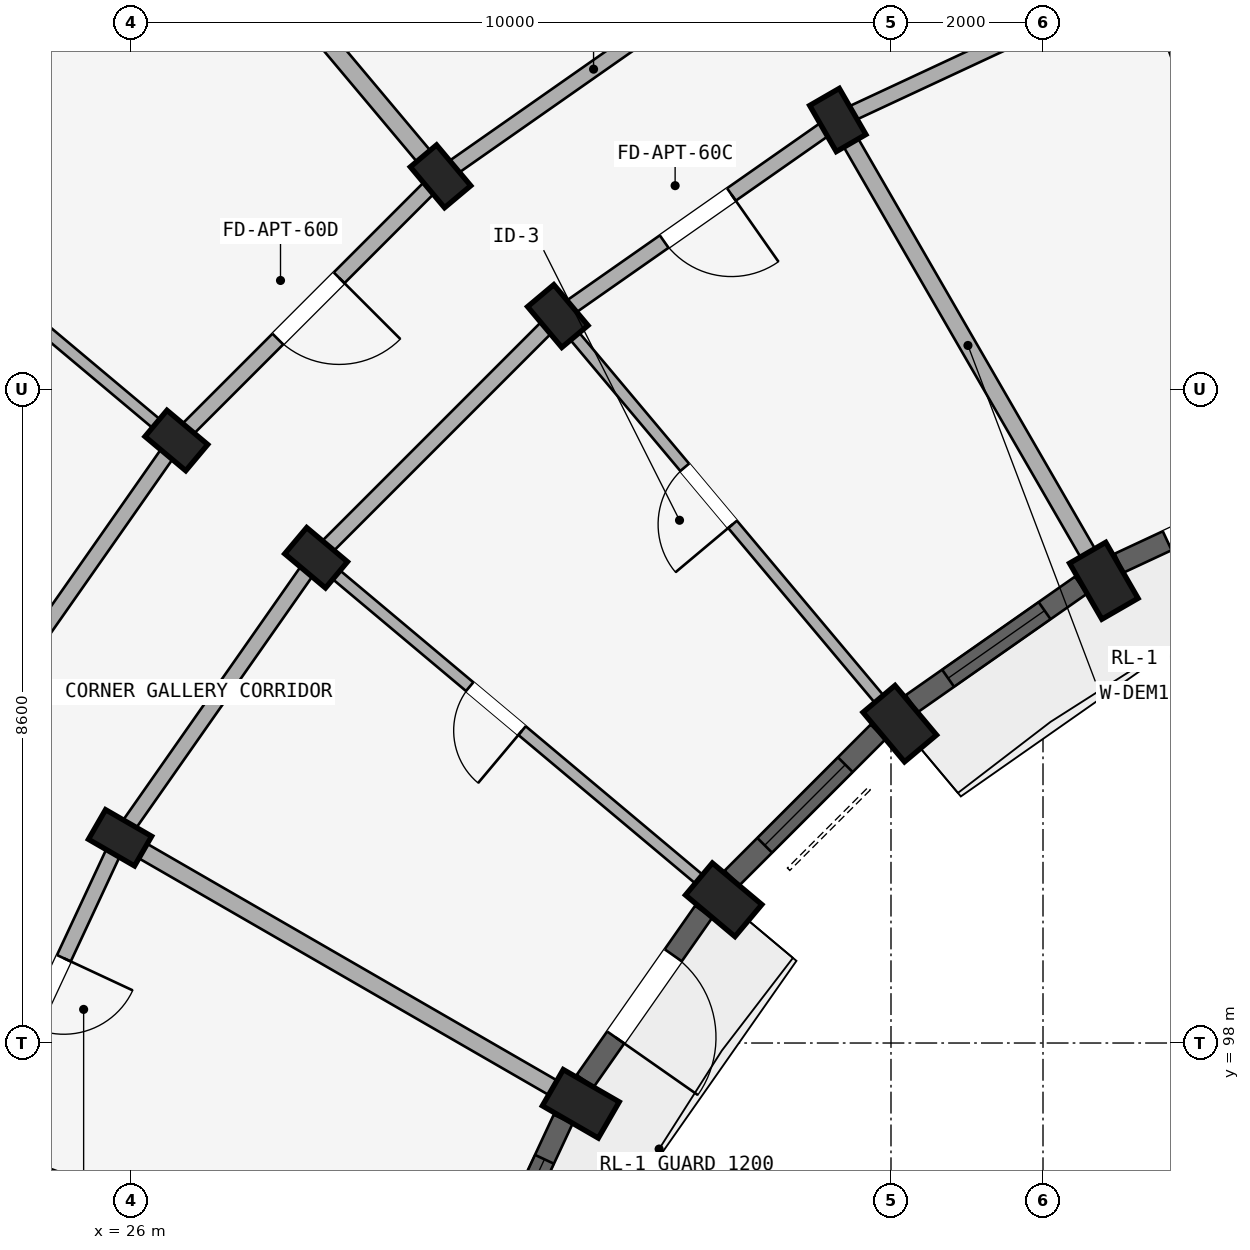
"""IFC4 building model, lengths in metres.
Left out: names, types, materials, properties, quantities, classifications, styles, units other than length and angle.
Written with IfcOpenShell. Run it as: python <this file> out.ifc"""

import sys

from ifc_helpers import new_model, si_unit, direction, frame, frame_2d, origin, origin_2d, place, context, subcontext, project, spatial, rectangle, extrude, element, fill, save


model = new_model("IFC4")
c1 = context("Model", 3, precision=1e-05, world=origin(), true_north=direction((0.0, 1.0)))
c2 = subcontext(c1, "Body", "Model", "MODEL_VIEW")
j1 = project(units=[si_unit("LENGTHUNIT", "METRE"), si_unit("PLANEANGLEUNIT", "RADIAN")], contexts=[c1])
p1 = place(None, origin())
s1 = spatial("IfcSite", under=j1, at=p1, CompositionType="ELEMENT")
p2 = place(p1, origin())
s2 = spatial("IfcBuilding", under=s1, at=p2, CompositionType="ELEMENT")
p3 = place(p2, frame((0.0, 0.0, 11.85)))
s3 = spatial("IfcBuildingStorey", under=s2, at=p3, CompositionType="ELEMENT", Elevation=11.85)
p4 = place(p3, frame((38.8, 104.081, 0.0), z_axis=(0.0, 0.0, 1.0), x_axis=(0.866025403784, 0.5, 0.0)))
e1 = element("IfcColumn", 1, at=p4, inside=s3, PredefinedType="COLUMN", context=c2, shape_type="SweptSolid", body=[
    extrude(rectangle(XDim=0.55, YDim=0.85, at=origin_2d()), origin(), (0.0, 0.0, 1.0), 2.93),
])
p5 = place(p3, frame((35.3, 110.144, 0.0), z_axis=(0.0, 0.0, 1.0), x_axis=(0.866025403784, 0.5, 0.0)))
e2 = element("IfcColumn", 2, at=p5, inside=s3, PredefinedType="COLUMN", context=c2, shape_type="SweptSolid", body=[
    extrude(rectangle(XDim=0.45, YDim=0.7, at=origin_2d()), origin(), (0.0, 0.0, 1.0), 2.93),
])
p6 = place(p3, frame((36.115, 102.202, 0.0), z_axis=(0.0, 0.0, 1.0), x_axis=(0.766044443119, 0.642787609687, 0.0)))
e3 = element("IfcColumn", 3, at=p6, inside=s3, PredefinedType="COLUMN", context=c2, shape_type="SweptSolid", body=[
    extrude(rectangle(XDim=0.55, YDim=0.85, at=origin_2d()), origin(), (0.0, 0.0, 1.0), 2.93),
])
for number, where, z_axis, x_axis in (
    (4, (31.616, 107.564, 0.0), (0.0, 0.0, 1.0), (0.766, 0.643, 0.0)),
    (5, (30.073, 109.402, 0.0), (0.0, 0.0, 1.0), (0.766, 0.643, 0.0)),
):
    element("IfcColumn", number, at=place(p3, frame(where, z_axis=z_axis, x_axis=x_axis)), inside=s3, PredefinedType="COLUMN", context=c2, shape_type="SweptSolid", body=[
        extrude(rectangle(XDim=0.45, YDim=0.7, at=origin_2d()), origin(), (0.0, 0.0, 1.0), 2.93),
    ])
p7 = place(p3, frame((33.798, 99.885, 0.0), z_axis=(0.0, 0.0, 1.0), x_axis=(0.642787609687, 0.766044443119, 0.0)))
e6 = element("IfcColumn", 6, at=p7, inside=s3, PredefinedType="COLUMN", context=c2, shape_type="SweptSolid", body=[
    extrude(rectangle(XDim=0.55, YDim=0.85, at=origin_2d()), origin(), (0.0, 0.0, 1.0), 2.93),
])
for number, where, z_axis, x_axis in (
    (7, (28.436, 104.384, 0.0), (0.0, 0.0, 1.0), (0.643, 0.766, 0.0)),
    (8, (26.598, 105.927, 0.0), (0.0, 0.0, 1.0), (0.643, 0.766, 0.0)),
):
    element("IfcColumn", number, at=place(p3, frame(where, z_axis=z_axis, x_axis=x_axis)), inside=s3, PredefinedType="COLUMN", context=c2, shape_type="SweptSolid", body=[
        extrude(rectangle(XDim=0.45, YDim=0.7, at=origin_2d()), origin(), (0.0, 0.0, 1.0), 2.93),
    ])
p8 = place(p3, frame((31.919, 97.2, 0.0), z_axis=(0.0, 0.0, 1.0), x_axis=(0.5, 0.866025403784, 0.0)))
e9 = element("IfcColumn", 9, at=p8, inside=s3, PredefinedType="COLUMN", context=c2, shape_type="SweptSolid", body=[
    extrude(rectangle(XDim=0.55, YDim=0.85, at=origin_2d()), origin(), (0.0, 0.0, 1.0), 2.93),
])
p9 = place(p3, frame((25.856, 100.7, 0.0), z_axis=(0.0, 0.0, 1.0), x_axis=(0.5, 0.866025403784, 0.0)))
e10 = element("IfcColumn", 10, at=p9, inside=s3, PredefinedType="COLUMN", context=c2, shape_type="SweptSolid", body=[
    extrude(rectangle(XDim=0.45, YDim=0.7, at=origin_2d()), origin(), (0.0, 0.0, 1.0), 2.93),
])
p10 = place(p3, frame((39.376, 112.044, 0.0), z_axis=(0.0, 0.0, 1.0), x_axis=(-0.906307919131, -0.422617978463, 0.0)))
e11 = element("IfcWall", 11, at=p10, inside=s3, PredefinedType="STANDARD", context=c2, shape_type="SweptSolid", body=[
    extrude(rectangle(XDim=4.497, YDim=0.2, at=frame_2d((2.249, 0.0))), origin(), (0.0, 0.0, 1.0), 2.372),
])
p11 = place(p3, frame((35.3, 110.144, 0.0), z_axis=(0.0, 0.0, 1.0), x_axis=(-0.819155404658, -0.573571637217, 0.0)))
e12 = element("IfcWall", 12, at=p11, inside=s3, PredefinedType="STANDARD", context=c2, shape_type="SweptSolid", body=[
    extrude(rectangle(XDim=4.497, YDim=0.2, at=frame_2d((2.249, 0.0))), origin(), (0.0, 0.0, 1.0), 2.372),
])
p12 = place(p11, frame((1.709, 0.0, 0.0)))
e13 = element("IfcOpeningElement", 13, at=p12, cuts=e12, PredefinedType="OPENING", context=c2, shape_type="SweptSolid", body=[
    extrude(rectangle(XDim=1.08, YDim=2.15, at=frame_2d((0.54, 1.075))), frame((0.0, 0.11, 0.0), z_axis=(0.0, -1.0, 0.0), x_axis=(1.0, 0.0, 0.0)), (0.0, 0.0, 1.0), 0.22),
])
p13 = place(p3, frame((34.1, 112.222, 0.0), z_axis=(0.0, 0.0, 1.0), x_axis=(-0.819140911474, -0.573592335331, 0.0)))
e14 = element("IfcWall", 14, at=p13, inside=s3, PredefinedType="STANDARD", context=c2, shape_type="SweptSolid", body=[
    extrude(rectangle(XDim=4.916, YDim=0.2, at=frame_2d((2.458, 0.0))), origin(), (0.0, 0.0, 1.0), 2.372),
])
p14 = place(p3, frame((31.616, 107.564, 0.0), z_axis=(0.0, 0.0, 1.0), x_axis=(-0.707106781187, -0.707106781187, 0.0)))
e15 = element("IfcWall", 15, at=p14, inside=s3, PredefinedType="STANDARD", context=c2, shape_type="SweptSolid", body=[
    extrude(rectangle(XDim=4.497, YDim=0.2, at=frame_2d((2.249, 0.0))), origin(), (0.0, 0.0, 1.0), 2.372),
])
p15 = place(p3, frame((30.073, 109.402, 0.0), z_axis=(0.0, 0.0, 1.0), x_axis=(-0.707106781187, -0.707106781187, 0.0)))
e16 = element("IfcWall", 16, at=p15, inside=s3, PredefinedType="STANDARD", context=c2, shape_type="SweptSolid", body=[
    extrude(rectangle(XDim=4.916, YDim=0.2, at=frame_2d((2.458, 0.0))), origin(), (0.0, 0.0, 1.0), 2.372),
])
p16 = place(p15, frame((1.888, 0.0, 0.0)))
e17 = element("IfcOpeningElement", 17, at=p16, cuts=e16, PredefinedType="OPENING", context=c2, shape_type="SweptSolid", body=[
    extrude(rectangle(XDim=1.14, YDim=2.15, at=frame_2d((0.57, 1.075))), frame((0.0, 0.11, 0.0), z_axis=(0.0, -1.0, 0.0), x_axis=(1.0, 0.0, 0.0)), (0.0, 0.0, 1.0), 0.22),
])
p17 = place(p3, frame((28.436, 104.384, 0.0), z_axis=(0.0, 0.0, 1.0), x_axis=(-0.573571637217, -0.819155404658, 0.0)))
e18 = element("IfcWall", 18, at=p17, inside=s3, PredefinedType="STANDARD", context=c2, shape_type="SweptSolid", body=[
    extrude(rectangle(XDim=4.497, YDim=0.2, at=frame_2d((2.249, 0.0))), origin(), (0.0, 0.0, 1.0), 2.372),
])
p18 = place(p3, frame((26.598, 105.927, 0.0), z_axis=(0.0, 0.0, 1.0), x_axis=(-0.573592335331, -0.819140911474, 0.0)))
e19 = element("IfcWall", 19, at=p18, inside=s3, PredefinedType="STANDARD", context=c2, shape_type="SweptSolid", body=[
    extrude(rectangle(XDim=4.916, YDim=0.2, at=frame_2d((2.458, 0.0))), origin(), (0.0, 0.0, 1.0), 2.372),
])
p19 = place(p3, frame((25.856, 100.7, 0.0), z_axis=(0.0, 0.0, 1.0), x_axis=(-0.422617978463, -0.906307919131, 0.0)))
e20 = element("IfcWall", 20, at=p19, inside=s3, PredefinedType="STANDARD", context=c2, shape_type="SweptSolid", body=[
    extrude(rectangle(XDim=4.497, YDim=0.2, at=frame_2d((2.249, 0.0))), origin(), (0.0, 0.0, 1.0), 2.372),
])
p20 = place(p19, frame((1.749, 0.0, 0.0)))
e21 = element("IfcOpeningElement", 21, at=p20, cuts=e20, PredefinedType="OPENING", context=c2, shape_type="SweptSolid", body=[
    extrude(rectangle(XDim=1.0, YDim=2.15, at=frame_2d((0.5, 1.075))), frame((0.0, 0.11, 0.0), z_axis=(0.0, -1.0, 0.0), x_axis=(1.0, 0.0, 0.0)), (0.0, 0.0, 1.0), 0.22),
])
p21 = place(p3, frame((41.702, 105.654, 0.0), z_axis=(0.0, 0.0, 1.0), x_axis=(-0.342010221662, 0.939696231917, 0.0)))
e22 = element("IfcWall", 22, at=p21, inside=s3, PredefinedType="PARTITIONING", context=c2, shape_type="SweptSolid", body=[
    extrude(rectangle(XDim=6.75, YDim=0.15, at=frame_2d((3.375, 0.0))), origin(), (0.0, 0.0, 1.0), 2.372),
])
p22 = place(p21, frame((3.262, 0.0, 0.0)))
e23 = element("IfcOpeningElement", 23, at=p22, cuts=e22, PredefinedType="OPENING", context=c2, shape_type="SweptSolid", body=[
    extrude(rectangle(XDim=0.9, YDim=2.1, at=frame_2d((0.45, 1.05))), frame((0.0, 0.085, 0.0), z_axis=(0.0, -1.0, 0.0), x_axis=(1.0, 0.0, 0.0)), (0.0, 0.0, 1.0), 0.17),
])
p23 = place(p3, frame((38.7, 104.254, 0.0), z_axis=(0.0, 0.0, 1.0), x_axis=(-0.499997969693, 0.866026575979, 0.0)))
e24 = element("IfcWall", 24, at=p23, inside=s3, PredefinedType="STANDARD", context=c2, shape_type="SweptSolid", body=[
    extrude(rectangle(XDim=6.75, YDim=0.22, at=frame_2d((3.375, 0.0))), origin(), (0.0, 0.0, 1.0), 2.372),
])
p24 = place(p3, frame((35.987, 102.355, 0.0), z_axis=(0.0, 0.0, 1.0), x_axis=(-0.642784846501, 0.766046761698, 0.0)))
e25 = element("IfcWall", 25, at=p24, inside=s3, PredefinedType="PARTITIONING", context=c2, shape_type="SweptSolid", body=[
    extrude(rectangle(XDim=6.75, YDim=0.15, at=frame_2d((3.375, 0.0))), origin(), (0.0, 0.0, 1.0), 2.372),
])
p25 = place(p24, frame((3.222, 0.0, 0.0)))
e26 = element("IfcOpeningElement", 26, at=p25, cuts=e25, PredefinedType="OPENING", context=c2, shape_type="SweptSolid", body=[
    extrude(rectangle(XDim=0.98, YDim=2.12, at=frame_2d((0.49, 1.06))), frame((0.0, 0.085, 0.0), z_axis=(0.0, -1.0, 0.0), x_axis=(1.0, 0.0, 0.0)), (0.0, 0.0, 1.0), 0.17),
])
p26 = place(p3, frame((30.009, 109.479, 0.0), z_axis=(0.0, 0.0, 1.0), x_axis=(-0.642784757967, 0.766046835987, 0.0)))
e27 = element("IfcWall", 27, at=p26, inside=s3, PredefinedType="STANDARD", context=c2, shape_type="SweptSolid", body=[
    extrude(rectangle(XDim=17.42, YDim=0.23, at=frame_2d((8.71, 0.0))), origin(), (0.0, 0.0, 1.0), 2.372),
])
p27 = place(p3, frame((33.645, 100.013, 0.0), z_axis=(0.0, 0.0, 1.0), x_axis=(-0.766046761698, 0.642784846501, 0.0)))
e28 = element("IfcWall", 28, at=p27, inside=s3, PredefinedType="PARTITIONING", context=c2, shape_type="SweptSolid", body=[
    extrude(rectangle(XDim=6.75, YDim=0.15, at=frame_2d((3.375, 0.0))), origin(), (0.0, 0.0, 1.0), 2.372),
])
p28 = place(p27, frame((3.262, 0.0, 0.0)))
e29 = element("IfcOpeningElement", 29, at=p28, cuts=e28, PredefinedType="OPENING", context=c2, shape_type="SweptSolid", body=[
    extrude(rectangle(XDim=0.9, YDim=2.1, at=frame_2d((0.45, 1.05))), frame((0.0, 0.085, 0.0), z_axis=(0.0, -1.0, 0.0), x_axis=(1.0, 0.0, 0.0)), (0.0, 0.0, 1.0), 0.17),
])
p29 = place(p3, frame((26.521, 105.991, 0.0), z_axis=(0.0, 0.0, 1.0), x_axis=(-0.766046835987, 0.642784757967, 0.0)))
e30 = element("IfcWall", 30, at=p29, inside=s3, PredefinedType="PARTITIONING", context=c2, shape_type="SweptSolid", body=[
    extrude(rectangle(XDim=17.42, YDim=0.15, at=frame_2d((8.71, 0.0))), origin(), (0.0, 0.0, 1.0), 2.372),
])
p30 = place(p29, frame((4.45, 0.0, 0.0)))
e31 = element("IfcOpeningElement", 31, at=p30, cuts=e30, PredefinedType="OPENING", context=c2, shape_type="SweptSolid", body=[
    extrude(rectangle(XDim=0.8, YDim=2.1, at=frame_2d((0.4, 1.05))), frame((0.0, 0.085, 0.0), z_axis=(0.0, -1.0, 0.0), x_axis=(1.0, 0.0, 0.0)), (0.0, 0.0, 1.0), 0.17),
])
p31 = place(p3, frame((31.746, 97.3, 0.0), z_axis=(0.0, 0.0, 1.0), x_axis=(-0.866026575979, 0.499997969693, 0.0)))
e32 = element("IfcWall", 32, at=p31, inside=s3, PredefinedType="STANDARD", context=c2, shape_type="SweptSolid", body=[
    extrude(rectangle(XDim=6.75, YDim=0.22, at=frame_2d((3.375, 0.0))), origin(), (0.0, 0.0, 1.0), 2.372),
])
p32 = place(p3, frame((30.346, 94.298, 0.0), z_axis=(0.0, 0.0, 1.0), x_axis=(-0.939696231917, 0.342010221662, 0.0)))
e33 = element("IfcWall", 33, at=p32, inside=s3, PredefinedType="PARTITIONING", context=c2, shape_type="SweptSolid", body=[
    extrude(rectangle(XDim=6.75, YDim=0.15, at=frame_2d((3.375, 0.0))), origin(), (0.0, 0.0, 1.0), 2.372),
])
p33 = place(p32, frame((3.222, 0.0, 0.0)))
e34 = element("IfcOpeningElement", 34, at=p33, cuts=e33, PredefinedType="OPENING", context=c2, shape_type="SweptSolid", body=[
    extrude(rectangle(XDim=0.98, YDim=2.12, at=frame_2d((0.49, 1.06))), frame((0.0, 0.085, 0.0), z_axis=(0.0, -1.0, 0.0), x_axis=(1.0, 0.0, 0.0)), (0.0, 0.0, 1.0), 0.17),
])
p34 = place(p3, frame((41.464, 105.461, 0.0), z_axis=(0.0, 0.0, 1.0), x_axis=(-0.906311629168, -0.422610022166, 0.0)))
e35 = element("IfcWall", 35, at=p34, inside=s3, PredefinedType="STANDARD", context=c2, shape_type="SweptSolid", body=[
    extrude(rectangle(XDim=2.718, YDim=0.275, at=frame_2d((1.359, 0.0))), origin(), (0.0, 0.0, 1.0), 2.422),
])
p35 = place(p34, frame((0.699, 0.0, 0.0)))
e36 = element("IfcOpeningElement", 36, at=p35, cuts=e35, PredefinedType="OPENING", context=c2, shape_type="SweptSolid", body=[
    extrude(rectangle(XDim=1.32, YDim=2.15, at=frame_2d((0.66, 1.075))), frame((0.0, 0.147, 0.0), z_axis=(0.0, -1.0, 0.0), x_axis=(1.0, 0.0, 0.0)), (0.0, 0.0, 1.0), 0.295),
])
p36 = place(p3, frame((38.499, 104.023, 0.0), z_axis=(0.0, 0.0, 1.0), x_axis=(-0.81917282593, -0.573546755948, 0.0)))
e37 = element("IfcWall", 37, at=p36, inside=s3, PredefinedType="STANDARD", context=c2, shape_type="SweptSolid", body=[
    extrude(rectangle(XDim=2.718, YDim=0.275, at=frame_2d((1.359, 0.0))), origin(), (0.0, 0.0, 1.0), 2.422),
])
p37 = place(p36, frame((0.584, 0.0, 0.622)))
e38 = element("IfcOpeningElement", 38, at=p37, cuts=e37, PredefinedType="OPENING", context=c2, shape_type="SweptSolid", body=[
    extrude(rectangle(XDim=1.55, YDim=1.6, at=frame_2d((0.775, 0.8))), frame((0.0, 0.147, 0.0), z_axis=(0.0, -1.0, 0.0), x_axis=(1.0, 0.0, 0.0)), (0.0, 0.0, 1.0), 0.295),
])
p38 = place(p3, frame((35.829, 102.092, 0.0), z_axis=(0.0, 0.0, 1.0), x_axis=(-0.707106781187, -0.707106781187, 0.0)))
e39 = element("IfcWall", 39, at=p38, inside=s3, PredefinedType="STANDARD", context=c2, shape_type="SweptSolid", body=[
    extrude(rectangle(XDim=2.718, YDim=0.275, at=frame_2d((1.359, 0.0))), origin(), (0.0, 0.0, 1.0), 2.422),
])
p39 = place(p38, frame((0.609, 0.0, 0.572)))
e40 = element("IfcOpeningElement", 40, at=p39, cuts=e39, PredefinedType="OPENING", context=c2, shape_type="SweptSolid", body=[
    extrude(rectangle(XDim=1.5, YDim=1.65, at=frame_2d((0.75, 0.825))), frame((0.0, 0.147, 0.0), z_axis=(0.0, -1.0, 0.0), x_axis=(1.0, 0.0, 0.0)), (0.0, 0.0, 1.0), 0.295),
])
p40 = place(p3, frame((33.535, 99.727, 0.0), z_axis=(0.0, 0.0, 1.0), x_axis=(-0.573546755948, -0.81917282593, 0.0)))
e41 = element("IfcWall", 41, at=p40, inside=s3, PredefinedType="STANDARD", context=c2, shape_type="SweptSolid", body=[
    extrude(rectangle(XDim=2.718, YDim=0.275, at=frame_2d((1.359, 0.0))), origin(), (0.0, 0.0, 1.0), 2.422),
])
p41 = place(p40, frame((0.699, 0.0, 0.0)))
e42 = element("IfcOpeningElement", 42, at=p41, cuts=e41, PredefinedType="OPENING", context=c2, shape_type="SweptSolid", body=[
    extrude(rectangle(XDim=1.32, YDim=2.15, at=frame_2d((0.66, 1.075))), frame((0.0, 0.147, 0.0), z_axis=(0.0, -1.0, 0.0), x_axis=(1.0, 0.0, 0.0)), (0.0, 0.0, 1.0), 0.295),
])
p42 = place(p3, frame((31.687, 96.999, 0.0), z_axis=(0.0, 0.0, 1.0), x_axis=(-0.422610022166, -0.906311629168, 0.0)))
e43 = element("IfcWall", 43, at=p42, inside=s3, PredefinedType="STANDARD", context=c2, shape_type="SweptSolid", body=[
    extrude(rectangle(XDim=2.718, YDim=0.275, at=frame_2d((1.359, 0.0))), origin(), (0.0, 0.0, 1.0), 2.422),
])
p43 = place(p42, frame((0.584, 0.0, 0.622)))
e44 = element("IfcOpeningElement", 44, at=p43, cuts=e43, PredefinedType="OPENING", context=c2, shape_type="SweptSolid", body=[
    extrude(rectangle(XDim=1.55, YDim=1.6, at=frame_2d((0.775, 0.8))), frame((0.0, 0.147, 0.0), z_axis=(0.0, -1.0, 0.0), x_axis=(1.0, 0.0, 0.0)), (0.0, 0.0, 1.0), 0.295),
])
p44 = place(p37, origin())
e45 = element("IfcWindow", 45, at=p44, inside=s3, PartitioningType="DOUBLE_PANEL_VERTICAL", PredefinedType="WINDOW", context=c2, shape_type="SweptSolid", body=[
    extrude(rectangle(XDim=1.55, YDim=1.6, at=frame_2d((0.775, 0.8))), frame((0.0, 0.03, 0.0), z_axis=(0.0, -1.0, 0.0), x_axis=(1.0, 0.0, 0.0)), (0.0, 0.0, 1.0), 0.06),
])
fill(e38, e45)
p45 = place(p39, origin())
e46 = element("IfcWindow", 46, at=p45, inside=s3, PartitioningType="DOUBLE_PANEL_VERTICAL", PredefinedType="WINDOW", context=c2, shape_type="SweptSolid", body=[
    extrude(rectangle(XDim=1.5, YDim=1.65, at=frame_2d((0.75, 0.825))), frame((0.0, 0.03, 0.0), z_axis=(0.0, -1.0, 0.0), x_axis=(1.0, 0.0, 0.0)), (0.0, 0.0, 1.0), 0.06),
])
fill(e40, e46)
p46 = place(p43, origin())
e47 = element("IfcWindow", 47, at=p46, inside=s3, PartitioningType="DOUBLE_PANEL_VERTICAL", PredefinedType="WINDOW", context=c2, shape_type="SweptSolid", body=[
    extrude(rectangle(XDim=1.55, YDim=1.6, at=frame_2d((0.775, 0.8))), frame((0.0, 0.03, 0.0), z_axis=(0.0, -1.0, 0.0), x_axis=(1.0, 0.0, 0.0)), (0.0, 0.0, 1.0), 0.06),
])
fill(e44, e47)
p47 = place(p25, frame((0.98, 0.0, 0.0), z_axis=(0.0, 0.0, 1.0), x_axis=(-1.0, 0.0, 0.0)))
e48 = element("IfcDoor", 48, at=p47, inside=s3, OperationType="SINGLE_SWING_RIGHT", PredefinedType="DOOR", context=c2, shape_type="SweptSolid", body=[
    extrude(rectangle(XDim=0.98, YDim=2.12, at=frame_2d((0.49, 1.06))), frame((0.0, 0.025, 0.0), z_axis=(0.0, -1.0, 0.0), x_axis=(1.0, 0.0, 0.0)), (0.0, 0.0, 1.0), 0.05),
])
fill(e26, e48)
p48 = place(p28, origin())
e49 = element("IfcDoor", 49, at=p48, inside=s3, OperationType="SINGLE_SWING_LEFT", PredefinedType="DOOR", context=c2, shape_type="SweptSolid", body=[
    extrude(rectangle(XDim=0.9, YDim=2.1, at=frame_2d((0.45, 1.05))), frame((0.0, 0.025, 0.0), z_axis=(0.0, -1.0, 0.0), x_axis=(1.0, 0.0, 0.0)), (0.0, 0.0, 1.0), 0.05),
])
fill(e29, e49)
p49 = place(p16, origin())
e50 = element("IfcDoor", 50, at=p49, inside=s3, OperationType="SINGLE_SWING_LEFT", PredefinedType="DOOR", context=c2, shape_type="SweptSolid", body=[
    extrude(rectangle(XDim=1.14, YDim=2.15, at=frame_2d((0.57, 1.075))), frame((0.0, 0.025, 0.0), z_axis=(0.0, -1.0, 0.0), x_axis=(1.0, 0.0, 0.0)), (0.0, 0.0, 1.0), 0.05),
])
fill(e17, e50)
p50 = place(p12, origin())
e51 = element("IfcDoor", 51, at=p50, inside=s3, OperationType="SINGLE_SWING_LEFT", PredefinedType="DOOR", context=c2, shape_type="SweptSolid", body=[
    extrude(rectangle(XDim=1.08, YDim=2.15, at=frame_2d((0.54, 1.075))), frame((0.0, 0.025, 0.0), z_axis=(0.0, -1.0, 0.0), x_axis=(1.0, 0.0, 0.0)), (0.0, 0.0, 1.0), 0.05),
])
fill(e13, e51)
p51 = place(p20, frame((1.0, 0.0, 0.0), z_axis=(0.0, 0.0, 1.0), x_axis=(-1.0, 0.0, 0.0)))
e52 = element("IfcDoor", 52, at=p51, inside=s3, OperationType="SINGLE_SWING_RIGHT", PredefinedType="DOOR", context=c2, shape_type="SweptSolid", body=[
    extrude(rectangle(XDim=1.0, YDim=2.15, at=frame_2d((0.5, 1.075))), frame((0.0, 0.025, 0.0), z_axis=(0.0, -1.0, 0.0), x_axis=(1.0, 0.0, 0.0)), (0.0, 0.0, 1.0), 0.05),
])
fill(e21, e52)
p52 = place(p35, origin())
e53 = element("IfcDoor", 53, at=p52, inside=s3, OperationType="SINGLE_SWING_LEFT", PredefinedType="DOOR", context=c2, shape_type="SweptSolid", body=[
    extrude(rectangle(XDim=1.32, YDim=2.15, at=frame_2d((0.66, 1.075))), frame((0.0, 0.025, 0.0), z_axis=(0.0, -1.0, 0.0), x_axis=(1.0, 0.0, 0.0)), (0.0, 0.0, 1.0), 0.05),
])
fill(e36, e53)
p53 = place(p41, origin())
e54 = element("IfcDoor", 54, at=p53, inside=s3, OperationType="SINGLE_SWING_RIGHT", PredefinedType="DOOR", context=c2, shape_type="SweptSolid", body=[
    extrude(rectangle(XDim=1.32, YDim=2.15, at=frame_2d((0.66, 1.075))), frame((0.0, 0.025, 0.0), z_axis=(0.0, -1.0, 0.0), x_axis=(1.0, 0.0, 0.0)), (0.0, 0.0, 1.0), 0.05),
])
fill(e42, e54)
save(model, sys.argv[1])
